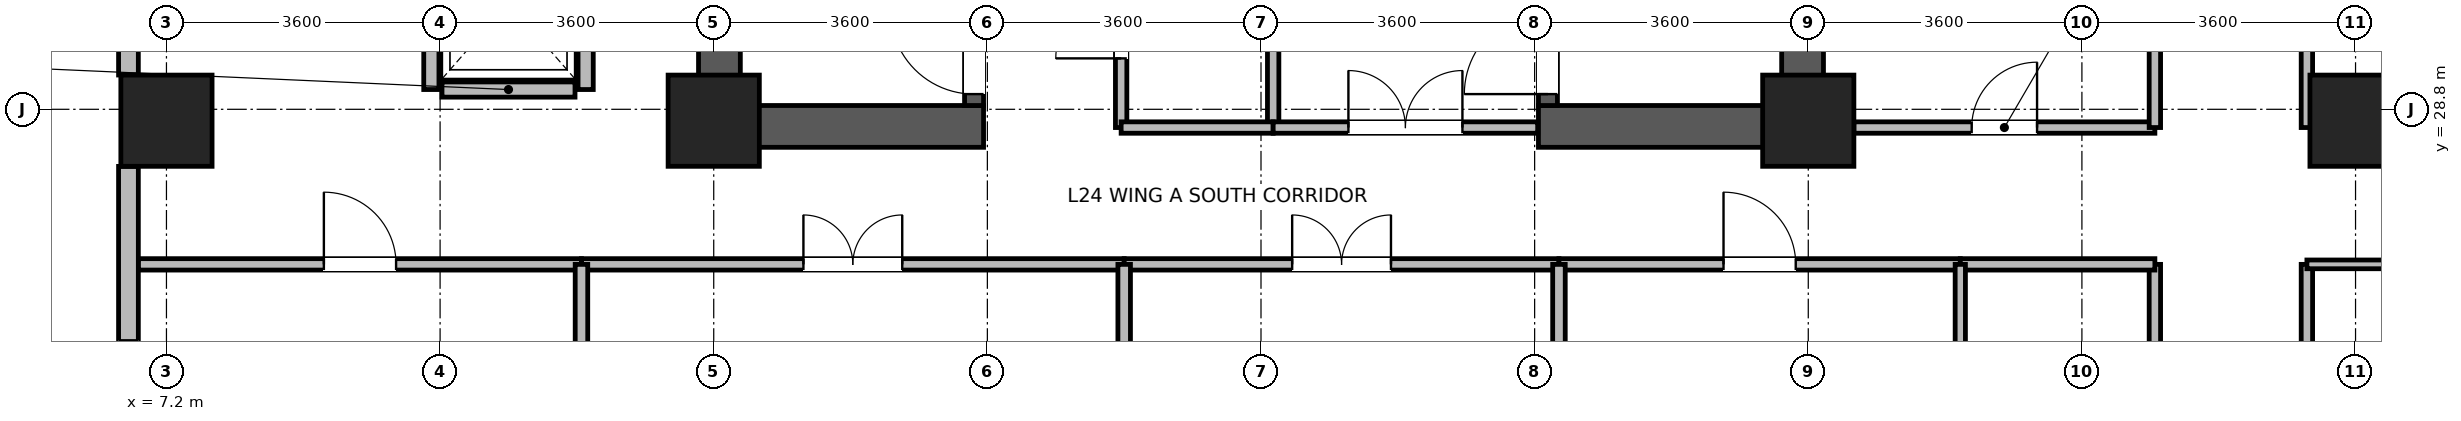
"""IFC4 building model, lengths in metres.
Left out: names, types, materials, properties, quantities, classifications, styles, units other than length and angle.
Written with IfcOpenShell. Run it as: python <this file> out.ifc"""

import sys

from ifc_helpers import new_model, si_unit, direction, frame, frame_2d, origin, origin_2d, place, context, subcontext, project, spatial, rectangle, extrude, source, transform, mapped, element, fill, save


model = new_model("IFC4")
c1 = context("Model", 3, precision=1e-05, world=origin(), true_north=direction((0.0, 1.0)))
c2 = subcontext(c1, "Body", "Model", "MODEL_VIEW")
j1 = project(units=[si_unit("LENGTHUNIT", "METRE"), si_unit("PLANEANGLEUNIT", "RADIAN")], contexts=[c1])
p1 = place(None, origin())
s1 = spatial("IfcSite", under=j1, at=p1, CompositionType="ELEMENT")
p2 = place(p1, origin())
s2 = spatial("IfcBuilding", under=s1, at=p2, CompositionType="ELEMENT")
p3 = place(p2, frame((0.0, 0.0, 97.1)))
s3 = spatial("IfcBuildingStorey", under=s2, at=p3, CompositionType="ELEMENT", Elevation=97.1)
for number, where, z_axis, x_axis in (
    (1, (14.475, 28.3, 0.0), (0.0, 0.0, 1.0), (0.0, 1.0, 0.0)),
    (2, (28.725, 28.3, 0.0), (0.0, 0.0, 1.0), (0.0, 1.0, 0.0)),
):
    element("IfcWall", number, at=place(p3, frame(where, z_axis=z_axis, x_axis=x_axis)), inside=s3, PredefinedType="SHEAR", context=c2, shape_type="SweptSolid", body=[
        extrude(rectangle(XDim=8.1, YDim=0.55, at=frame_2d((4.05, 0.0))), origin(), (0.0, 0.0, 1.0), 3.45),
    ])
for number, where, z_axis, x_axis in (
    (3, (14.75, 28.575, 0.0), (0.0, 0.0, 1.0), (1.0, 0.0, 0.0)),
    (4, (25.25, 28.575, 0.0), (0.0, 0.0, 1.0), (1.0, 0.0, 0.0)),
):
    element("IfcWall", number, at=place(p3, frame(where, z_axis=z_axis, x_axis=x_axis)), inside=s3, PredefinedType="SHEAR", context=c2, shape_type="SweptSolid", body=[
        extrude(rectangle(XDim=3.2, YDim=0.55, at=frame_2d((1.6, 0.0))), origin(), (0.0, 0.0, 1.0), 3.45),
    ])
p4 = place(p3, frame((17.825, 28.85, 0.0), z_axis=(0.0, 0.0, 1.0), x_axis=(0.0, 1.0, 0.0)))
e5 = element("IfcWall", 5, at=p4, inside=s3, PredefinedType="SHEAR", context=c2, shape_type="SweptSolid", body=[
    extrude(rectangle(XDim=7.0, YDim=0.25, at=frame_2d((3.5, 0.0))), origin(), (0.0, 0.0, 1.0), 3.45),
])
p5 = place(p4, frame((0.15, 0.0, 0.0)))
e6 = element("IfcOpeningElement", 6, at=p5, cuts=e5, PredefinedType="OPENING", context=c2, shape_type="SweptSolid", body=[
    extrude(rectangle(XDim=1.1, YDim=2.08, at=frame_2d((0.55, 1.04))), frame((0.0, 0.135, 0.0), z_axis=(0.0, -1.0, 0.0), x_axis=(1.0, 0.0, 0.0)), (0.0, 0.0, 1.0), 0.27),
])
p6 = place(p3, frame((25.375, 28.85, 0.0), z_axis=(0.0, 0.0, 1.0), x_axis=(0.0, 1.0, 0.0)))
e7 = element("IfcWall", 7, at=p6, inside=s3, PredefinedType="SHEAR", context=c2, shape_type="SweptSolid", body=[
    extrude(rectangle(XDim=7.0, YDim=0.25, at=frame_2d((3.5, 0.0))), origin(), (0.0, 0.0, 1.0), 3.45),
])
p7 = place(p6, frame((0.15, 0.0, 0.0)))
e8 = element("IfcOpeningElement", 8, at=p7, cuts=e7, PredefinedType="OPENING", context=c2, shape_type="SweptSolid", body=[
    extrude(rectangle(XDim=1.1, YDim=2.08, at=frame_2d((0.55, 1.04))), frame((0.0, 0.135, 0.0), z_axis=(0.0, -1.0, 0.0), x_axis=(1.0, 0.0, 0.0)), (0.0, 0.0, 1.0), 0.27),
])
m1 = source(origin(), c2, "Body", "SweptSolid", [
    extrude(rectangle(XDim=1.2, YDim=1.2, at=origin_2d()), origin(), (0.0, 0.0, 1.0), 3.7),
])
for number, where, z_axis, x_axis in (
    (9, (7.2, 28.65, 0.0), (0.0, 0.0, 1.0), (1.0, 0.0, 0.0)),
    (10, (14.4, 28.65, 0.0), (0.0, 0.0, 1.0), (1.0, 0.0, 0.0)),
    (11, (28.8, 28.65, 0.0), (0.0, 0.0, 1.0), (1.0, 0.0, 0.0)),
    (12, (36.0, 28.65, 0.0), (0.0, 0.0, 1.0), (1.0, 0.0, 0.0)),
):
    element("IfcColumn", number, at=place(p3, frame(where, z_axis=z_axis, x_axis=x_axis)), inside=s3, PredefinedType="COLUMN", context=c2, shape_type="MappedRepresentation", body=[
        mapped(m1, transform((0.0, 0.0, 0.0), x_axis=(1.0, 0.0, 0.0), y_axis=(0.0, 1.0, 0.0), z_axis=(0.0, 0.0, 1.0), scale=1.0)),
    ])
p8 = place(p3, frame((6.7, 29.251, 0.0), z_axis=(0.0, 0.0, 1.0), x_axis=(0.0, 1.0, 0.0)))
e13 = element("IfcWall", 13, at=p8, inside=s3, PredefinedType="STANDARD", context=c2, shape_type="SweptSolid", body=[
    extrude(rectangle(XDim=6.298, YDim=0.26, at=frame_2d((3.149, 0.0))), origin(), (0.0, 0.0, 1.0), 3.43),
])
p9 = place(p8, frame((0.675, 0.0, 0.85)))
e14 = element("IfcOpeningElement", 14, at=p9, cuts=e13, PredefinedType="OPENING", context=c2, shape_type="SweptSolid", body=[
    extrude(rectangle(XDim=1.8, YDim=1.85, at=frame_2d((0.9, 0.925))), frame((0.0, 0.14, 0.0), z_axis=(0.0, -1.0, 0.0), x_axis=(1.0, 0.0, 0.0)), (0.0, 0.0, 1.0), 0.28),
])
p10 = place(p8, frame((3.823, 0.0, 0.85)))
e15 = element("IfcOpeningElement", 15, at=p10, cuts=e13, PredefinedType="OPENING", context=c2, shape_type="SweptSolid", body=[
    extrude(rectangle(XDim=1.8, YDim=1.85, at=frame_2d((0.9, 0.925))), frame((0.0, 0.14, 0.0), z_axis=(0.0, -1.0, 0.0), x_axis=(1.0, 0.0, 0.0)), (0.0, 0.0, 1.0), 0.28),
])
p11 = place(p3, frame((6.7, 21.47, 0.0), z_axis=(0.0, 0.0, 1.0), x_axis=(0.0, 1.0, 0.0)))
e16 = element("IfcWall", 16, at=p11, inside=s3, PredefinedType="STANDARD", context=c2, shape_type="SweptSolid", body=[
    extrude(rectangle(XDim=6.579, YDim=0.26, at=frame_2d((3.29, 0.0))), origin(), (0.0, 0.0, 1.0), 3.43),
])
p12 = place(p11, frame((0.745, 0.0, 0.85)))
e17 = element("IfcOpeningElement", 17, at=p12, cuts=e16, PredefinedType="OPENING", context=c2, shape_type="SweptSolid", body=[
    extrude(rectangle(XDim=1.8, YDim=1.85, at=frame_2d((0.9, 0.925))), frame((0.0, 0.14, 0.0), z_axis=(0.0, -1.0, 0.0), x_axis=(1.0, 0.0, 0.0)), (0.0, 0.0, 1.0), 0.28),
])
p13 = place(p11, frame((3.341, 0.0, 0.85)))
e18 = element("IfcOpeningElement", 18, at=p13, cuts=e16, PredefinedType="OPENING", context=c2, shape_type="SweptSolid", body=[
    extrude(rectangle(XDim=0.95, YDim=1.75, at=frame_2d((0.475, 0.875))), frame((0.0, 0.14, 0.0), z_axis=(0.0, -1.0, 0.0), x_axis=(1.0, 0.0, 0.0)), (0.0, 0.0, 1.0), 0.28),
])
p14 = place(p3, frame((10.825, 29.06, 0.0), z_axis=(0.0, 0.0, 1.0), x_axis=(1.0, 0.0, 0.0)))
e19 = element("IfcWall", 19, at=p14, inside=s3, PredefinedType="PARTITIONING", context=c2, shape_type="SweptSolid", body=[
    extrude(rectangle(XDim=1.75, YDim=0.2, at=frame_2d((0.875, 0.0))), origin(), (0.0, 0.0, 1.0), 3.43),
])
for number, where, z_axis, x_axis in (
    (20, (10.685, 29.06, 0.0), (0.0, 0.0, 1.0), (0.0, 1.0, 0.0)),
    (21, (12.715, 29.06, 0.0), (0.0, 0.0, 1.0), (0.0, 1.0, 0.0)),
):
    element("IfcWall", number, at=place(p3, frame(where, z_axis=z_axis, x_axis=x_axis)), inside=s3, PredefinedType="PARTITIONING", context=c2, shape_type="SweptSolid", body=[
        extrude(rectangle(XDim=2.28, YDim=0.2, at=frame_2d((1.14, 0.0))), origin(), (0.0, 0.0, 1.0), 3.43),
    ])
p15 = place(p3, frame((35.36, 16.96, 0.0), z_axis=(0.0, 0.0, 1.0), x_axis=(0.0, 1.0, 0.0)))
e22 = element("IfcWall", 22, at=p15, inside=s3, PredefinedType="PARTITIONING", context=c2, shape_type="SweptSolid", body=[
    extrude(rectangle(XDim=9.8, YDim=0.15, at=frame_2d((4.9, 0.0))), origin(), (0.0, 0.0, 1.0), 3.43),
])
p16 = place(p15, frame((2.486, 0.0, 0.0)))
e23 = element("IfcOpeningElement", 23, at=p16, cuts=e22, PredefinedType="OPENING", context=c2, shape_type="SweptSolid", body=[
    extrude(rectangle(XDim=1.3, YDim=2.12, at=frame_2d((0.65, 1.06))), frame((0.0, 0.085, 0.0), z_axis=(0.0, -1.0, 0.0), x_axis=(1.0, 0.0, 0.0)), (0.0, 0.0, 1.0), 0.17),
])
p17 = place(p3, frame((35.36, 28.56, 0.0), z_axis=(0.0, 0.0, 1.0), x_axis=(0.0, 1.0, 0.0)))
e24 = element("IfcWall", 24, at=p17, inside=s3, PredefinedType="PARTITIONING", context=c2, shape_type="SweptSolid", body=[
    extrude(rectangle(XDim=7.68, YDim=0.15, at=frame_2d((3.84, 0.0))), origin(), (0.0, 0.0, 1.0), 3.43),
])
p18 = place(p17, frame((3.19, 0.0, 0.0)))
e25 = element("IfcOpeningElement", 25, at=p18, cuts=e24, PredefinedType="OPENING", context=c2, shape_type="SweptSolid", body=[
    extrude(rectangle(XDim=1.3, YDim=2.12, at=frame_2d((0.65, 1.06))), frame((0.0, 0.085, 0.0), z_axis=(0.0, -1.0, 0.0), x_axis=(1.0, 0.0, 0.0)), (0.0, 0.0, 1.0), 0.17),
])
p19 = place(p3, frame((12.66, 26.76, 0.0), z_axis=(0.0, 0.0, 1.0), x_axis=(1.0, 0.0, 0.0)))
e26 = element("IfcWall", 26, at=p19, inside=s3, PredefinedType="PARTITIONING", context=c2, shape_type="SweptSolid", body=[
    extrude(rectangle(XDim=7.14, YDim=0.15, at=frame_2d((3.57, 0.0))), origin(), (0.0, 0.0, 1.0), 3.43),
])
p20 = place(p19, frame((2.92, 0.0, 0.0)))
e27 = element("IfcOpeningElement", 27, at=p20, cuts=e26, PredefinedType="OPENING", context=c2, shape_type="SweptSolid", body=[
    extrude(rectangle(XDim=1.3, YDim=2.12, at=frame_2d((0.65, 1.06))), frame((0.0, 0.085, 0.0), z_axis=(0.0, -1.0, 0.0), x_axis=(1.0, 0.0, 0.0)), (0.0, 0.0, 1.0), 0.17),
])
p21 = place(p3, frame((6.832, 26.76, 0.0), z_axis=(0.0, 0.0, 1.0), x_axis=(1.0, 0.0, 0.0)))
e28 = element("IfcWall", 28, at=p21, inside=s3, PredefinedType="PARTITIONING", context=c2, shape_type="SweptSolid", body=[
    extrude(rectangle(XDim=5.828, YDim=0.15, at=frame_2d((2.914, 0.0))), origin(), (0.0, 0.0, 1.0), 3.43),
])
p22 = place(p21, frame((2.439, 0.0, 0.0)))
e29 = element("IfcOpeningElement", 29, at=p22, cuts=e28, PredefinedType="OPENING", context=c2, shape_type="SweptSolid", body=[
    extrude(rectangle(XDim=0.95, YDim=2.1, at=frame_2d((0.475, 1.05))), frame((0.0, 0.085, 0.0), z_axis=(0.0, -1.0, 0.0), x_axis=(1.0, 0.0, 0.0)), (0.0, 0.0, 1.0), 0.17),
])
p23 = place(p3, frame((19.8, 26.76, 0.0), z_axis=(0.0, 0.0, 1.0), x_axis=(1.0, 0.0, 0.0)))
e30 = element("IfcWall", 30, at=p23, inside=s3, PredefinedType="PARTITIONING", context=c2, shape_type="SweptSolid", body=[
    extrude(rectangle(XDim=5.72, YDim=0.15, at=frame_2d((2.86, 0.0))), origin(), (0.0, 0.0, 1.0), 3.43),
])
p24 = place(p23, frame((2.21, 0.0, 0.0)))
e31 = element("IfcOpeningElement", 31, at=p24, cuts=e30, PredefinedType="OPENING", context=c2, shape_type="SweptSolid", body=[
    extrude(rectangle(XDim=1.3, YDim=2.12, at=frame_2d((0.65, 1.06))), frame((0.0, 0.085, 0.0), z_axis=(0.0, -1.0, 0.0), x_axis=(1.0, 0.0, 0.0)), (0.0, 0.0, 1.0), 0.17),
])
p25 = place(p3, frame((25.52, 26.76, 0.0), z_axis=(0.0, 0.0, 1.0), x_axis=(1.0, 0.0, 0.0)))
e32 = element("IfcWall", 32, at=p25, inside=s3, PredefinedType="PARTITIONING", context=c2, shape_type="SweptSolid", body=[
    extrude(rectangle(XDim=5.28, YDim=0.15, at=frame_2d((2.64, 0.0))), origin(), (0.0, 0.0, 1.0), 3.43),
])
p26 = place(p25, frame((2.165, 0.0, 0.0)))
e33 = element("IfcOpeningElement", 33, at=p26, cuts=e32, PredefinedType="OPENING", context=c2, shape_type="SweptSolid", body=[
    extrude(rectangle(XDim=0.95, YDim=2.1, at=frame_2d((0.475, 1.05))), frame((0.0, 0.085, 0.0), z_axis=(0.0, -1.0, 0.0), x_axis=(1.0, 0.0, 0.0)), (0.0, 0.0, 1.0), 0.17),
])
p27 = place(p3, frame((33.36, 21.6, 0.0), z_axis=(0.0, 0.0, 1.0), x_axis=(0.0, 1.0, 0.0)))
e34 = element("IfcWall", 34, at=p27, inside=s3, PredefinedType="PARTITIONING", context=c2, shape_type="SweptSolid", body=[
    extrude(rectangle(XDim=5.16, YDim=0.15, at=frame_2d((2.58, 0.0))), origin(), (0.0, 0.0, 1.0), 3.43),
])
p28 = place(p27, frame((2.155, 0.0, 0.0)))
e35 = element("IfcOpeningElement", 35, at=p28, cuts=e34, PredefinedType="OPENING", context=c2, shape_type="SweptSolid", body=[
    extrude(rectangle(XDim=0.85, YDim=2.04, at=frame_2d((0.425, 1.02))), frame((0.0, 0.085, 0.0), z_axis=(0.0, -1.0, 0.0), x_axis=(1.0, 0.0, 0.0)), (0.0, 0.0, 1.0), 0.17),
])
p29 = place(p3, frame((29.4, 28.56, 0.0), z_axis=(0.0, 0.0, 1.0), x_axis=(1.0, 0.0, 0.0)))
e36 = element("IfcWall", 36, at=p29, inside=s3, PredefinedType="PARTITIONING", context=c2, shape_type="SweptSolid", body=[
    extrude(rectangle(XDim=3.96, YDim=0.15, at=frame_2d((1.98, 0.0))), origin(), (0.0, 0.0, 1.0), 2.78),
])
p30 = place(p29, frame((1.55, 0.0, 0.0)))
e37 = element("IfcOpeningElement", 37, at=p30, cuts=e36, PredefinedType="OPENING", context=c2, shape_type="SweptSolid", body=[
    extrude(rectangle(XDim=0.86, YDim=2.02, at=frame_2d((0.43, 1.01))), frame((0.0, 0.085, 0.0), z_axis=(0.0, -1.0, 0.0), x_axis=(1.0, 0.0, 0.0)), (0.0, 0.0, 1.0), 0.17),
])
p31 = place(p3, frame((33.36, 28.56, 0.0), z_axis=(0.0, 0.0, 1.0), x_axis=(0.0, 1.0, 0.0)))
e38 = element("IfcWall", 38, at=p31, inside=s3, PredefinedType="PARTITIONING", context=c2, shape_type="SweptSolid", body=[
    extrude(rectangle(XDim=3.08, YDim=0.15, at=frame_2d((1.54, 0.0))), origin(), (0.0, 0.0, 1.0), 3.43),
])
p32 = place(p3, frame((19.76, 28.56, 0.0), z_axis=(0.0, 0.0, 1.0), x_axis=(0.0, 1.0, 0.0)))
e39 = element("IfcWall", 39, at=p32, inside=s3, PredefinedType="PARTITIONING", context=c2, shape_type="SweptSolid", body=[
    extrude(rectangle(XDim=2.68, YDim=0.15, at=frame_2d((1.34, 0.0))), origin(), (0.0, 0.0, 1.0), 3.43),
])
p33 = place(p32, frame((0.91, 0.0, 0.0)))
e40 = element("IfcOpeningElement", 40, at=p33, cuts=e39, PredefinedType="OPENING", context=c2, shape_type="SweptSolid", body=[
    extrude(rectangle(XDim=0.86, YDim=2.02, at=frame_2d((0.43, 1.01))), frame((0.0, 0.085, 0.0), z_axis=(0.0, -1.0, 0.0), x_axis=(1.0, 0.0, 0.0)), (0.0, 0.0, 1.0), 0.17),
])
p34 = place(p3, frame((21.76, 28.56, 0.0), z_axis=(0.0, 0.0, 1.0), x_axis=(0.0, 1.0, 0.0)))
e41 = element("IfcWall", 41, at=p34, inside=s3, PredefinedType="PARTITIONING", context=c2, shape_type="SweptSolid", body=[
    extrude(rectangle(XDim=2.68, YDim=0.15, at=frame_2d((1.34, 0.0))), origin(), (0.0, 0.0, 1.0), 3.43),
])
p35 = place(p3, frame((30.8, 26.76, 0.0), z_axis=(0.0, 0.0, 1.0), x_axis=(1.0, 0.0, 0.0)))
e42 = element("IfcWall", 42, at=p35, inside=s3, PredefinedType="PARTITIONING", context=c2, shape_type="SweptSolid", body=[
    extrude(rectangle(XDim=2.56, YDim=0.15, at=frame_2d((1.28, 0.0))), origin(), (0.0, 0.0, 1.0), 3.43),
])
p36 = place(p3, frame((19.76, 28.56, 0.0), z_axis=(0.0, 0.0, 1.0), x_axis=(1.0, 0.0, 0.0)))
e43 = element("IfcWall", 43, at=p36, inside=s3, PredefinedType="PARTITIONING", context=c2, shape_type="SweptSolid", body=[
    extrude(rectangle(XDim=2.0, YDim=0.15, at=frame_2d((1.0, 0.0))), origin(), (0.0, 0.0, 1.0), 2.43),
])
p37 = place(p3, frame((35.36, 26.76, 0.0), z_axis=(0.0, 0.0, 1.0), x_axis=(1.0, 0.0, 0.0)))
e44 = element("IfcWall", 44, at=p37, inside=s3, PredefinedType="PARTITIONING", context=c2, shape_type="SweptSolid", body=[
    extrude(rectangle(XDim=5.86, YDim=0.115, at=frame_2d((2.93, 0.0))), origin(), (0.0, 0.0, 1.0), 3.43),
])
for number, where, z_axis, x_axis in (
    (45, (19.8, 21.62, 0.0), (0.0, 0.0, 1.0), (0.0, 1.0, 0.0)),
    (46, (25.52, 21.62, 0.0), (0.0, 0.0, 1.0), (0.0, 1.0, 0.0)),
):
    element("IfcWall", number, at=place(p3, frame(where, z_axis=z_axis, x_axis=x_axis)), inside=s3, PredefinedType="PARTITIONING", context=c2, shape_type="SweptSolid", body=[
        extrude(rectangle(XDim=5.14, YDim=0.165, at=frame_2d((2.57, 0.0))), origin(), (0.0, 0.0, 1.0), 3.43),
    ])
p38 = place(p3, frame((30.8, 21.62, 0.0), z_axis=(0.0, 0.0, 1.0), x_axis=(0.0, 1.0, 0.0)))
e47 = element("IfcWall", 47, at=p38, inside=s3, PredefinedType="PARTITIONING", context=c2, shape_type="SweptSolid", body=[
    extrude(rectangle(XDim=5.14, YDim=0.135, at=frame_2d((2.57, 0.0))), origin(), (0.0, 0.0, 1.0), 3.43),
])
p39 = place(p3, frame((21.76, 28.56, 0.0), z_axis=(0.0, 0.0, 1.0), x_axis=(1.0, 0.0, 0.0)))
e48 = element("IfcWall", 48, at=p39, inside=s3, PredefinedType="PARTITIONING", context=c2, shape_type="SweptSolid", body=[
    extrude(rectangle(XDim=3.48, YDim=0.15, at=frame_2d((1.74, 0.0))), origin(), (0.0, 0.0, 1.0), 2.43),
])
p40 = place(p39, frame((0.99, 0.0, 0.0)))
e49 = element("IfcOpeningElement", 49, at=p40, cuts=e48, PredefinedType="OPENING", context=c2, shape_type="SweptSolid", body=[
    extrude(rectangle(XDim=1.5, YDim=2.1, at=frame_2d((0.75, 1.05))), frame((0.0, 0.085, 0.0), z_axis=(0.0, -1.0, 0.0), x_axis=(1.0, 0.0, 0.0)), (0.0, 0.0, 1.0), 0.17),
])
p41 = place(p3, frame((12.66, 23.5, 0.0), z_axis=(0.0, 0.0, 1.0), x_axis=(0.0, 1.0, 0.0)))
e50 = element("IfcWall", 50, at=p41, inside=s3, PredefinedType="PARTITIONING", context=c2, shape_type="SweptSolid", body=[
    extrude(rectangle(XDim=3.26, YDim=0.165, at=frame_2d((1.63, 0.0))), origin(), (0.0, 0.0, 1.0), 3.43),
])
p42 = place(p13, origin())
e51 = element("IfcWindow", 51, at=p42, inside=s3, PartitioningType="SINGLE_PANEL", PredefinedType="WINDOW", context=c2, shape_type="SweptSolid", body=[
    extrude(rectangle(XDim=0.95, YDim=1.75, at=frame_2d((0.475, 0.875))), frame((0.0, 0.03, 0.0), z_axis=(0.0, -1.0, 0.0), x_axis=(1.0, 0.0, 0.0)), (0.0, 0.0, 1.0), 0.06),
])
fill(e18, e51)
p43 = place(p5, origin())
e52 = element("IfcDoor", 52, at=p43, inside=s3, OperationType="SINGLE_SWING_RIGHT", PredefinedType="DOOR", context=c2, shape_type="SweptSolid", body=[
    extrude(rectangle(XDim=1.1, YDim=2.08, at=frame_2d((0.55, 1.04))), frame((0.0, 0.025, 0.0), z_axis=(0.0, -1.0, 0.0), x_axis=(1.0, 0.0, 0.0)), (0.0, 0.0, 1.0), 0.05),
])
fill(e6, e52)
p44 = place(p7, origin())
e53 = element("IfcDoor", 53, at=p44, inside=s3, OperationType="SINGLE_SWING_LEFT", PredefinedType="DOOR", context=c2, shape_type="SweptSolid", body=[
    extrude(rectangle(XDim=1.1, YDim=2.08, at=frame_2d((0.55, 1.04))), frame((0.0, 0.025, 0.0), z_axis=(0.0, -1.0, 0.0), x_axis=(1.0, 0.0, 0.0)), (0.0, 0.0, 1.0), 0.05),
])
fill(e8, e53)
p45 = place(p20, origin())
e54 = element("IfcDoor", 54, at=p45, inside=s3, OperationType="DOUBLE_DOOR_SINGLE_SWING", PredefinedType="DOOR", context=c2, shape_type="SweptSolid", body=[
    extrude(rectangle(XDim=1.3, YDim=2.12, at=frame_2d((0.65, 1.06))), frame((0.0, 0.025, 0.0), z_axis=(0.0, -1.0, 0.0), x_axis=(1.0, 0.0, 0.0)), (0.0, 0.0, 1.0), 0.05),
])
fill(e27, e54)
p46 = place(p22, origin())
e55 = element("IfcDoor", 55, at=p46, inside=s3, OperationType="SINGLE_SWING_LEFT", PredefinedType="DOOR", context=c2, shape_type="SweptSolid", body=[
    extrude(rectangle(XDim=0.95, YDim=2.1, at=frame_2d((0.475, 1.05))), frame((0.0, 0.025, 0.0), z_axis=(0.0, -1.0, 0.0), x_axis=(1.0, 0.0, 0.0)), (0.0, 0.0, 1.0), 0.05),
])
fill(e29, e55)
p47 = place(p24, origin())
e56 = element("IfcDoor", 56, at=p47, inside=s3, OperationType="DOUBLE_DOOR_SINGLE_SWING", PredefinedType="DOOR", context=c2, shape_type="SweptSolid", body=[
    extrude(rectangle(XDim=1.3, YDim=2.12, at=frame_2d((0.65, 1.06))), frame((0.0, 0.025, 0.0), z_axis=(0.0, -1.0, 0.0), x_axis=(1.0, 0.0, 0.0)), (0.0, 0.0, 1.0), 0.05),
])
fill(e31, e56)
p48 = place(p26, origin())
e57 = element("IfcDoor", 57, at=p48, inside=s3, OperationType="SINGLE_SWING_LEFT", PredefinedType="DOOR", context=c2, shape_type="SweptSolid", body=[
    extrude(rectangle(XDim=0.95, YDim=2.1, at=frame_2d((0.475, 1.05))), frame((0.0, 0.025, 0.0), z_axis=(0.0, -1.0, 0.0), x_axis=(1.0, 0.0, 0.0)), (0.0, 0.0, 1.0), 0.05),
])
fill(e33, e57)
p49 = place(p30, origin())
e58 = element("IfcDoor", 58, at=p49, inside=s3, OperationType="SINGLE_SWING_RIGHT", PredefinedType="DOOR", context=c2, shape_type="SweptSolid", body=[
    extrude(rectangle(XDim=0.86, YDim=2.02, at=frame_2d((0.43, 1.01))), frame((0.0, 0.025, 0.0), z_axis=(0.0, -1.0, 0.0), x_axis=(1.0, 0.0, 0.0)), (0.0, 0.0, 1.0), 0.05),
])
fill(e37, e58)
p50 = place(p33, origin())
e59 = element("IfcDoor", 59, at=p50, inside=s3, OperationType="SINGLE_SWING_LEFT", PredefinedType="DOOR", context=c2, shape_type="SweptSolid", body=[
    extrude(rectangle(XDim=0.86, YDim=2.02, at=frame_2d((0.43, 1.01))), frame((0.0, 0.025, 0.0), z_axis=(0.0, -1.0, 0.0), x_axis=(1.0, 0.0, 0.0)), (0.0, 0.0, 1.0), 0.05),
])
fill(e40, e59)
p51 = place(p40, origin())
e60 = element("IfcDoor", 60, at=p51, inside=s3, OperationType="DOUBLE_DOOR_SINGLE_SWING", PredefinedType="DOOR", context=c2, shape_type="SweptSolid", body=[
    extrude(rectangle(XDim=1.5, YDim=2.1, at=frame_2d((0.75, 1.05))), frame((0.0, 0.025, 0.0), z_axis=(0.0, -1.0, 0.0), x_axis=(1.0, 0.0, 0.0)), (0.0, 0.0, 1.0), 0.05),
])
fill(e49, e60)
save(model, sys.argv[1])
